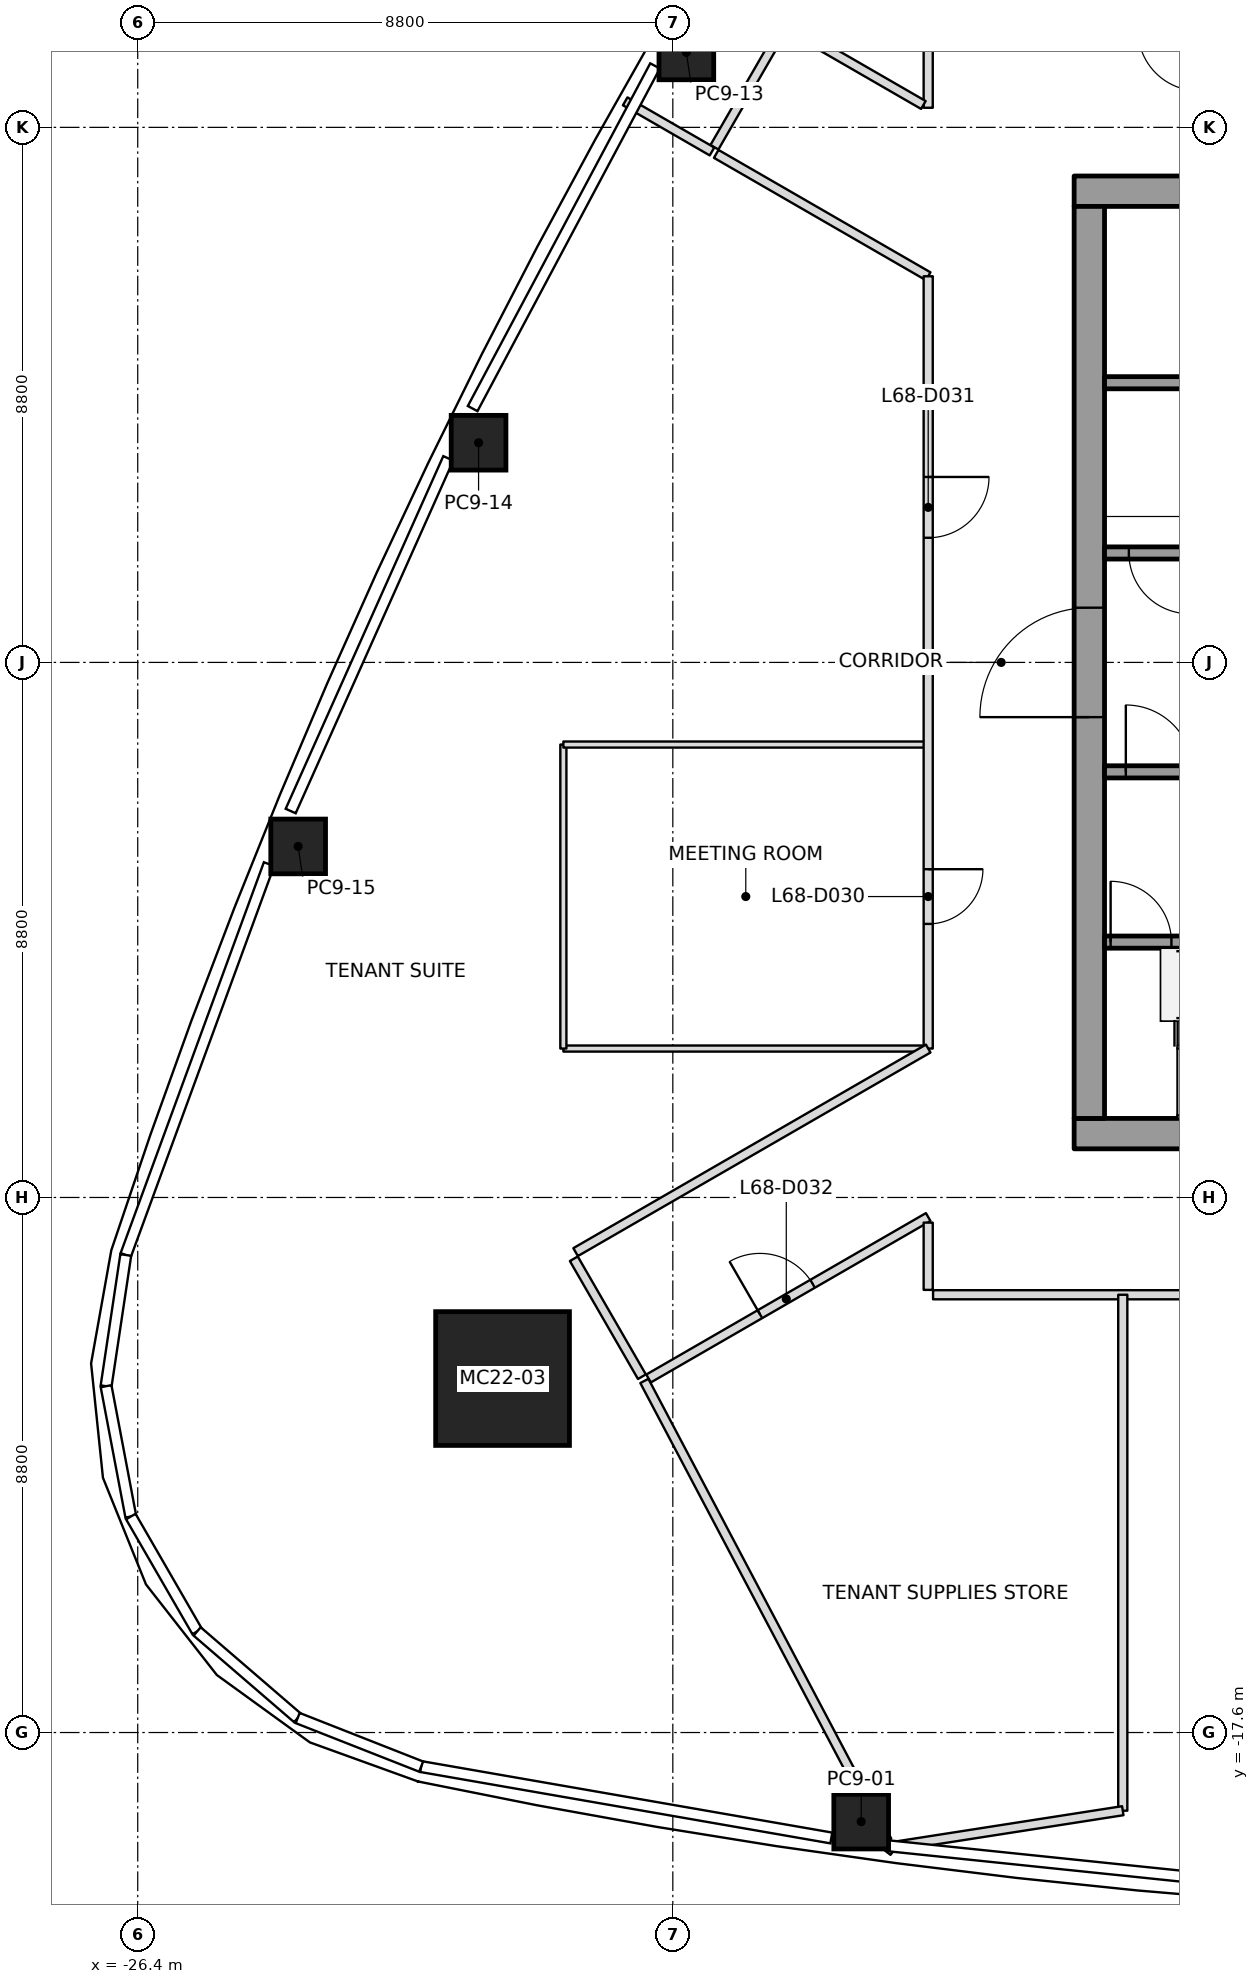
"""IFC4 building model, lengths in metres.
Left out: names, types, materials, properties, quantities, classifications, styles, units other than length and angle.
Written with IfcOpenShell. Run it as: python <this file> out.ifc"""

import sys

from ifc_helpers import new_model, si_unit, direction, frame, frame_2d, origin, origin_2d, place, context, subcontext, project, spatial, rectangle, extrude, element, fill, save


model = new_model("IFC4")
c1 = context("Model", 3, precision=1e-05, world=origin(), true_north=direction((0.0, 1.0)))
c2 = subcontext(c1, "Body", "Model", "MODEL_VIEW")
j1 = project(units=[si_unit("LENGTHUNIT", "METRE"), si_unit("PLANEANGLEUNIT", "RADIAN")], contexts=[c1])
p1 = place(None, origin())
s1 = spatial("IfcSite", under=j1, at=p1, CompositionType="ELEMENT")
p2 = place(p1, origin())
s2 = spatial("IfcBuilding", under=s1, at=p2, CompositionType="ELEMENT")
p3 = place(p2, frame((0.0, 0.0, 299.0)))
s3 = spatial("IfcBuildingStorey", under=s2, at=p3, CompositionType="ELEMENT", Elevation=299.0)
p4 = place(p3, frame((-20.4, -11.778, 0.0), z_axis=(0.027695790401, 0.015983033227, 0.999488612163), x_axis=(0.999616398022, -0.00044283261, -0.027692249912)))
e1 = element("IfcColumn", 1, at=p4, inside=s3, PredefinedType="COLUMN", context=c2, shape_type="SweptSolid", body=[
    extrude(rectangle(XDim=2.2, YDim=2.2, at=origin_2d()), origin(), (0.0, 0.0, 1.0), 4.002),
])
p5 = place(p3, frame((-14.502, -19.065, 0.0), z_axis=(0.017452456582, 0.010373837829, 0.999793876381), x_axis=(-0.99036627662, 0.137561189622, 0.015860556206)))
e2 = element("IfcColumn", 2, at=p5, inside=s3, PredefinedType="COLUMN", context=c2, shape_type="SweptSolid", body=[
    extrude(rectangle(XDim=0.9, YDim=0.9, at=origin_2d()), origin(), (0.0, 0.0, 1.0), 4.001),
])
p6 = place(p3, frame((-17.377, 10.033, 0.0), z_axis=(0.009887049298, -0.00573692984, 0.999934664812), x_axis=(0.499975560967, 0.866039512843, 2.5126546e-05)))
e3 = element("IfcColumn", 3, at=p6, inside=s3, PredefinedType="COLUMN", context=c2, shape_type="SweptSolid", body=[
    extrude(rectangle(XDim=0.9, YDim=0.9, at=origin_2d()), origin(), (0.0, 0.0, 1.0), 4.0),
])
p7 = place(p3, frame((-20.795, 3.613, 0.0), z_axis=(0.014097691364, 0.002013955909, 0.999898594398), x_axis=(0.439136769139, 0.898384596408, -0.008000932944)))
e4 = element("IfcColumn", 4, at=p7, inside=s3, PredefinedType="COLUMN", context=c2, shape_type="SweptSolid", body=[
    extrude(rectangle(XDim=0.9, YDim=0.9, at=origin_2d()), origin(), (0.0, 0.0, 1.0), 4.0),
])
p8 = place(p3, frame((-23.762, -3.027, 0.0), z_axis=(0.017696558482, 0.009885663704, 0.999794531627), x_axis=(0.376217086223, 0.926396492836, -0.015819042166)))
e5 = element("IfcColumn", 5, at=p8, inside=s3, PredefinedType="COLUMN", context=c2, shape_type="SweptSolid", body=[
    extrude(rectangle(XDim=0.9, YDim=0.9, at=origin_2d()), origin(), (0.0, 0.0, 1.0), 4.001),
])
p9 = place(p3, frame((-11.0, -7.75, 0.0), z_axis=(0.0, 0.0, 1.0), x_axis=(1.0, 0.0, 0.0)))
e6 = element("IfcWall", 6, at=p9, inside=s3, PredefinedType="SHEAR", context=c2, shape_type="SweptSolid", body=[
    extrude(rectangle(XDim=22.0, YDim=0.5, at=frame_2d((11.0, 0.0))), origin(), (0.0, 0.0, 1.0), 4.0),
])
p10 = place(p9, frame((10.45, 0.0, 0.0)))
e7 = element("IfcOpeningElement", 7, at=p10, cuts=e6, PredefinedType="OPENING", context=c2, shape_type="SweptSolid", body=[
    extrude(rectangle(XDim=1.1, YDim=2.1, at=frame_2d((0.55, 1.05))), frame((0.0, 0.25, 0.0), z_axis=(0.0, -1.0, 0.0), x_axis=(1.0, 0.0, 0.0)), (0.0, 0.0, 1.0), 0.5),
])
p11 = place(p3, frame((-11.0, 7.75, 0.0), z_axis=(0.0, 0.0, 1.0), x_axis=(1.0, 0.0, 0.0)))
e8 = element("IfcWall", 8, at=p11, inside=s3, PredefinedType="SHEAR", context=c2, shape_type="SweptSolid", body=[
    extrude(rectangle(XDim=22.0, YDim=0.5, at=frame_2d((11.0, 0.0))), origin(), (0.0, 0.0, 1.0), 4.0),
])
p12 = place(p11, frame((10.45, 0.0, 0.0)))
e9 = element("IfcOpeningElement", 9, at=p12, cuts=e8, PredefinedType="OPENING", context=c2, shape_type="SweptSolid", body=[
    extrude(rectangle(XDim=1.1, YDim=2.1, at=frame_2d((0.55, 1.05))), frame((0.0, 0.25, 0.0), z_axis=(0.0, -1.0, 0.0), x_axis=(1.0, 0.0, 0.0)), (0.0, 0.0, 1.0), 0.5),
])
p13 = place(p3, frame((-10.75, -7.5, 0.0), z_axis=(0.0, 0.0, 1.0), x_axis=(0.0, 1.0, 0.0)))
e10 = element("IfcWall", 10, at=p13, inside=s3, PredefinedType="SHEAR", context=c2, shape_type="SweptSolid", body=[
    extrude(rectangle(XDim=15.0, YDim=0.5, at=frame_2d((7.5, 0.0))), origin(), (0.0, 0.0, 1.0), 4.0),
])
p14 = place(p13, frame((6.6, 0.0, 0.0)))
e11 = element("IfcOpeningElement", 11, at=p14, cuts=e10, PredefinedType="OPENING", context=c2, shape_type="SweptSolid", body=[
    extrude(rectangle(XDim=1.8, YDim=2.1, at=frame_2d((0.9, 1.05))), frame((0.0, 0.25, 0.0), z_axis=(0.0, -1.0, 0.0), x_axis=(1.0, 0.0, 0.0)), (0.0, 0.0, 1.0), 0.5),
])
p15 = place(p3, frame((-10.5, -4.6, 0.0), z_axis=(0.0, 0.0, 1.0), x_axis=(1.0, 0.0, 0.0)))
e12 = element("IfcWall", 12, at=p15, inside=s3, PredefinedType="SOLIDWALL", context=c2, shape_type="SweptSolid", body=[
    extrude(rectangle(XDim=1.8, YDim=0.2, at=frame_2d((0.9, 0.0))), origin(), (0.0, 0.0, 1.0), 3.85),
])
p16 = place(p15, frame((0.1, 0.0, 0.0)))
e13 = element("IfcOpeningElement", 13, at=p16, cuts=e12, PredefinedType="OPENING", context=c2, shape_type="SweptSolid", body=[
    extrude(rectangle(XDim=1.0, YDim=2.1, at=frame_2d((0.5, 1.05))), frame((0.0, 0.1, 0.0), z_axis=(0.0, -1.0, 0.0), x_axis=(1.0, 0.0, 0.0)), (0.0, 0.0, 1.0), 0.2),
])
p17 = place(p3, frame((-10.5, -1.8, 0.0), z_axis=(0.0, 0.0, 1.0), x_axis=(1.0, 0.0, 0.0)))
e14 = element("IfcWall", 14, at=p17, inside=s3, PredefinedType="SOLIDWALL", context=c2, shape_type="SweptSolid", body=[
    extrude(rectangle(XDim=1.8, YDim=0.2, at=frame_2d((0.9, 0.0))), origin(), (0.0, 0.0, 1.0), 3.85),
])
p18 = place(p17, frame((0.35, 0.0, 0.0)))
e15 = element("IfcOpeningElement", 15, at=p18, cuts=e14, PredefinedType="OPENING", context=c2, shape_type="SweptSolid", body=[
    extrude(rectangle(XDim=1.1, YDim=2.1, at=frame_2d((0.55, 1.05))), frame((0.0, 0.1, 0.0), z_axis=(0.0, -1.0, 0.0), x_axis=(1.0, 0.0, 0.0)), (0.0, 0.0, 1.0), 0.2),
])
p19 = place(p3, frame((-8.7, 1.8, 0.0), z_axis=(0.0, 0.0, 1.0), x_axis=(-1.0, 0.0, 0.0)))
e16 = element("IfcWall", 16, at=p19, inside=s3, PredefinedType="SOLIDWALL", context=c2, shape_type="SweptSolid", body=[
    extrude(rectangle(XDim=1.8, YDim=0.2, at=frame_2d((0.9, 0.0))), origin(), (0.0, 0.0, 1.0), 3.85),
])
p20 = place(p19, frame((0.4, 0.0, 0.0)))
e17 = element("IfcOpeningElement", 17, at=p20, cuts=e16, PredefinedType="OPENING", context=c2, shape_type="SweptSolid", body=[
    extrude(rectangle(XDim=1.0, YDim=2.1, at=frame_2d((0.5, 1.05))), frame((0.0, 0.1, 0.0), z_axis=(0.0, -1.0, 0.0), x_axis=(1.0, 0.0, 0.0)), (0.0, 0.0, 1.0), 0.2),
])
p21 = place(p3, frame((-8.7, 4.6, 0.0), z_axis=(0.0, 0.0, 1.0), x_axis=(-1.0, 0.0, 0.0)))
e18 = element("IfcWall", 18, at=p21, inside=s3, PredefinedType="SOLIDWALL", context=c2, shape_type="SweptSolid", body=[
    extrude(rectangle(XDim=1.8, YDim=0.2, at=frame_2d((0.9, 0.0))), origin(), (0.0, 0.0, 1.0), 3.85),
])
p22 = place(p3, frame((-16.956, 8.404, 0.0), z_axis=(0.0, 0.0, 1.0), x_axis=(-0.865983361098, 0.500072813, 0.0)))
e19 = element("IfcWall", 19, at=p22, inside=s3, PredefinedType="PARTITIONING", context=c2, shape_type="SweptSolid", body=[
    extrude(rectangle(XDim=1.649, YDim=0.15, at=frame_2d((0.824, 0.0))), origin(), (0.0, 0.0, 1.0), 3.234),
])
p23 = place(p3, frame((-18.068, -11.817, 0.0), z_axis=(0.0, 0.0, 1.0), x_axis=(0.467006069064, -0.88425411023, 0.0)))
e20 = element("IfcWall", 20, at=p23, inside=s3, PredefinedType="PARTITIONING", context=c2, shape_type="SweptSolid", body=[
    extrude(rectangle(XDim=8.552, YDim=0.15, at=frame_2d((4.276, 0.0))), origin(), (0.0, 0.0, 1.0), 3.45),
])
p24 = place(p3, frame((-10.2, -10.4, 0.0), z_axis=(0.0, 0.0, 1.0), x_axis=(0.0, -1.0, 0.0)))
e21 = element("IfcWall", 21, at=p24, inside=s3, PredefinedType="PARTITIONING", context=c2, shape_type="SweptSolid", body=[
    extrude(rectangle(XDim=8.486, YDim=0.15, at=frame_2d((4.243, 0.0))), origin(), (0.0, 0.0, 1.0), 3.45),
])
p25 = place(p3, frame((-10.2, -18.886, 0.0), z_axis=(0.0, 0.0, 1.0), x_axis=(-0.988077086967, -0.15395996301, 0.0)))
e22 = element("IfcWall", 22, at=p25, inside=s3, PredefinedType="PARTITIONING", context=c2, shape_type="SweptSolid", body=[
    extrude(rectangle(XDim=3.769, YDim=0.15, at=frame_2d((1.885, 0.0))), origin(), (0.0, 0.0, 1.0), 3.234),
])
p26 = place(p3, frame((-13.974, -19.552, 0.0), z_axis=(0.0, 0.0, 1.0), x_axis=(-0.791052984113, 0.611747641047, 0.0)))
e23 = element("IfcWall", 23, at=p26, inside=s3, PredefinedType="PARTITIONING", context=c2, shape_type="SweptSolid", body=[
    extrude(rectangle(XDim=0.185, YDim=0.15, at=frame_2d((0.093, 0.0))), origin(), (0.0, 0.0, 1.0), 3.45),
])
p27 = place(p3, frame((-19.228, -9.808, 0.0), z_axis=(0.0, 0.0, 1.0), x_axis=(0.49994888933, -0.866054910533, 0.0)))
e24 = element("IfcWall", 24, at=p27, inside=s3, PredefinedType="PARTITIONING", context=c2, shape_type="SweptSolid", body=[
    extrude(rectangle(XDim=2.24, YDim=0.15, at=frame_2d((1.12, 0.0))), origin(), (0.0, 0.0, 1.0), 3.233),
])
p28 = place(p3, frame((-16.886, 8.364, 0.0), z_axis=(0.0, 0.0, 1.0), x_axis=(0.866040157966, -0.499974444137, 0.0)))
e25 = element("IfcWall", 25, at=p28, inside=s3, PredefinedType="PARTITIONING", context=c2, shape_type="SweptSolid", body=[
    extrude(rectangle(XDim=4.026, YDim=0.15, at=frame_2d((2.013, 0.0))), origin(), (0.0, 0.0, 1.0), 3.45),
])
p29 = place(p3, frame((-13.4, 6.351, 0.0), z_axis=(0.0, 0.0, 1.0), x_axis=(0.0, -1.0, 0.0)))
e26 = element("IfcWall", 26, at=p29, inside=s3, PredefinedType="PARTITIONING", context=c2, shape_type="SweptSolid", body=[
    extrude(rectangle(XDim=12.702, YDim=0.15, at=frame_2d((6.351, 0.0))), origin(), (0.0, 0.0, 1.0), 3.317),
])
p30 = place(p29, frame((9.752, 0.0, 0.0)))
e27 = element("IfcOpeningElement", 27, at=p30, cuts=e26, PredefinedType="OPENING", context=c2, shape_type="SweptSolid", body=[
    extrude(rectangle(XDim=0.9, YDim=2.1, at=frame_2d((0.45, 1.05))), frame((0.0, 0.075, 0.0), z_axis=(0.0, -1.0, 0.0), x_axis=(1.0, 0.0, 0.0)), (0.0, 0.0, 1.0), 0.15),
])
p31 = place(p29, frame((3.301, 0.0, 0.0)))
e28 = element("IfcOpeningElement", 28, at=p31, cuts=e26, PredefinedType="OPENING", context=c2, shape_type="SweptSolid", body=[
    extrude(rectangle(XDim=1.0, YDim=2.1, at=frame_2d((0.5, 1.05))), frame((0.0, 0.075, 0.0), z_axis=(0.0, -1.0, 0.0), x_axis=(1.0, 0.0, 0.0)), (0.0, 0.0, 1.0), 0.15),
])
p32 = place(p3, frame((-13.4, -6.351, 0.0), z_axis=(0.0, 0.0, 1.0), x_axis=(-0.866028933908, -0.499993885596, 0.0)))
e29 = element("IfcWall", 29, at=p32, inside=s3, PredefinedType="PARTITIONING", context=c2, shape_type="SweptSolid", body=[
    extrude(rectangle(XDim=6.696, YDim=0.15, at=frame_2d((3.348, 0.0))), origin(), (0.0, 0.0, 1.0), 3.247),
])
p33 = place(p3, frame((-17.999, -11.777, 0.0), z_axis=(0.0, 0.0, 1.0), x_axis=(0.866036293601, 0.499981137809, 0.0)))
e30 = element("IfcWall", 30, at=p33, inside=s3, PredefinedType="PARTITIONING", context=c2, shape_type="SweptSolid", body=[
    extrude(rectangle(XDim=5.31, YDim=0.15, at=frame_2d((2.655, 0.0))), origin(), (0.0, 0.0, 1.0), 3.233),
])
p34 = place(p33, frame((2.115, 0.0, 0.0)))
e31 = element("IfcOpeningElement", 31, at=p34, cuts=e30, PredefinedType="OPENING", context=c2, shape_type="SweptSolid", body=[
    extrude(rectangle(XDim=1.0, YDim=2.1, at=frame_2d((0.5, 1.05))), frame((0.0, 0.075, 0.0), z_axis=(0.0, -1.0, 0.0), x_axis=(1.0, 0.0, 0.0)), (0.0, 0.0, 1.0), 0.15),
])
p35 = place(p3, frame((-13.4, -9.214, 0.0), z_axis=(0.0, 0.0, 1.0), x_axis=(0.0, -1.0, 0.0)))
e32 = element("IfcWall", 32, at=p35, inside=s3, PredefinedType="PARTITIONING", context=c2, shape_type="SweptSolid", body=[
    extrude(rectangle(XDim=1.106, YDim=0.15, at=frame_2d((0.553, 0.0))), origin(), (0.0, 0.0, 1.0), 3.233),
])
p36 = place(p3, frame((-15.795, 10.413, 0.0), z_axis=(0.0, 0.0, 1.0), x_axis=(-0.500030632641, -0.866007717299, 0.0)))
e33 = element("IfcWall", 33, at=p36, inside=s3, PredefinedType="PARTITIONING", context=c2, shape_type="SweptSolid", body=[
    extrude(rectangle(XDim=2.24, YDim=0.15, at=frame_2d((1.12, 0.0))), origin(), (0.0, 0.0, 1.0), 3.45),
])
p37 = place(p3, frame((-13.4, 10.32, 0.0), z_axis=(0.0, 0.0, 1.0), x_axis=(0.0, -1.0, 0.0)))
e34 = element("IfcWall", 34, at=p37, inside=s3, PredefinedType="PARTITIONING", context=c2, shape_type="SweptSolid", body=[
    extrude(rectangle(XDim=1.198, YDim=0.15, at=frame_2d((0.599, 0.0))), origin(), (0.0, 0.0, 1.0), 3.45),
])
p38 = place(p3, frame((-13.479, 9.168, 0.0), z_axis=(0.0, 0.0, 1.0), x_axis=(-0.866051946521, 0.499954023813, 0.0)))
e35 = element("IfcWall", 35, at=p38, inside=s3, PredefinedType="PARTITIONING", context=c2, shape_type="SweptSolid", body=[
    extrude(rectangle(XDim=2.464, YDim=0.15, at=frame_2d((1.232, 0.0))), origin(), (0.0, 0.0, 1.0), 3.45),
])
p39 = place(p3, frame((-13.32, -10.4, 0.0), z_axis=(0.0, 0.0, 1.0), x_axis=(1.0, 0.0, 0.0)))
e36 = element("IfcWall", 36, at=p39, inside=s3, PredefinedType="PARTITIONING", context=c2, shape_type="SweptSolid", body=[
    extrude(rectangle(XDim=12.12, YDim=0.15, at=frame_2d((6.06, 0.0))), origin(), (0.0, 0.0, 1.0), 3.393),
])
p40 = place(p39, frame((7.12, 0.0, 0.0)))
e37 = element("IfcOpeningElement", 37, at=p40, cuts=e36, PredefinedType="OPENING", context=c2, shape_type="SweptSolid", body=[
    extrude(rectangle(XDim=1.0, YDim=2.1, at=frame_2d((0.5, 1.05))), frame((0.0, 0.075, 0.0), z_axis=(0.0, -1.0, 0.0), x_axis=(1.0, 0.0, 0.0)), (0.0, 0.0, 1.0), 0.15),
])
p41 = place(p3, frame((-13.46, -6.351, 0.0), z_axis=(0.0, 0.0, 1.0), x_axis=(-1.0, 0.0, 0.0)))
e38 = element("IfcWall", 38, at=p41, inside=s3, PredefinedType="PARTITIONING", context=c2, shape_type="SweptSolid", body=[
    extrude(rectangle(XDim=5.94, YDim=0.1, at=frame_2d((2.97, 0.0))), origin(), (0.0, 0.0, 1.0), 3.247),
])
p42 = place(p3, frame((-19.4, -6.351, 0.0), z_axis=(0.0, 0.0, 1.0), x_axis=(0.0, 1.0, 0.0)))
e39 = element("IfcWall", 39, at=p42, inside=s3, PredefinedType="PARTITIONING", context=c2, shape_type="SweptSolid", body=[
    extrude(rectangle(XDim=5.0, YDim=0.1, at=frame_2d((2.5, 0.0))), origin(), (0.0, 0.0, 1.0), 3.247),
])
p43 = place(p3, frame((-19.4, -1.351, 0.0), z_axis=(0.0, 0.0, 1.0), x_axis=(1.0, 0.0, 0.0)))
e40 = element("IfcWall", 40, at=p43, inside=s3, PredefinedType="PARTITIONING", context=c2, shape_type="SweptSolid", body=[
    extrude(rectangle(XDim=5.97, YDim=0.1, at=frame_2d((2.985, 0.0))), origin(), (0.0, 0.0, 1.0), 3.317),
])
p44 = place(p30, origin())
e41 = element("IfcDoor", 41, at=p44, inside=s3, OperationType="SINGLE_SWING_LEFT", PredefinedType="DOOR", context=c2, shape_type="SweptSolid", body=[
    extrude(rectangle(XDim=0.9, YDim=2.1, at=frame_2d((0.45, 1.05))), frame((0.0, 0.025, 0.0), z_axis=(0.0, -1.0, 0.0), x_axis=(1.0, 0.0, 0.0)), (0.0, 0.0, 1.0), 0.05),
])
fill(e27, e41)
p45 = place(p31, origin())
e42 = element("IfcDoor", 42, at=p45, inside=s3, OperationType="SINGLE_SWING_LEFT", PredefinedType="DOOR", context=c2, shape_type="SweptSolid", body=[
    extrude(rectangle(XDim=1.0, YDim=2.1, at=frame_2d((0.5, 1.05))), frame((0.0, 0.025, 0.0), z_axis=(0.0, -1.0, 0.0), x_axis=(1.0, 0.0, 0.0)), (0.0, 0.0, 1.0), 0.05),
])
fill(e28, e42)
p46 = place(p34, origin())
e43 = element("IfcDoor", 43, at=p46, inside=s3, OperationType="SINGLE_SWING_RIGHT", PredefinedType="DOOR", context=c2, shape_type="SweptSolid", body=[
    extrude(rectangle(XDim=1.0, YDim=2.1, at=frame_2d((0.5, 1.05))), frame((0.0, 0.025, 0.0), z_axis=(0.0, -1.0, 0.0), x_axis=(1.0, 0.0, 0.0)), (0.0, 0.0, 1.0), 0.05),
])
fill(e31, e43)
p47 = place(p18, origin())
e44 = element("IfcDoor", 44, at=p47, inside=s3, OperationType="SINGLE_SWING_RIGHT", PredefinedType="DOOR", context=c2, shape_type="SweptSolid", body=[
    extrude(rectangle(XDim=1.1, YDim=2.1, at=frame_2d((0.55, 1.05))), frame((0.0, 0.025, 0.0), z_axis=(0.0, -1.0, 0.0), x_axis=(1.0, 0.0, 0.0)), (0.0, 0.0, 1.0), 0.05),
])
fill(e15, e44)
p48 = place(p20, origin())
e45 = element("IfcDoor", 45, at=p48, inside=s3, OperationType="SINGLE_SWING_LEFT", PredefinedType="DOOR", context=c2, shape_type="SweptSolid", body=[
    extrude(rectangle(XDim=1.0, YDim=2.1, at=frame_2d((0.5, 1.05))), frame((0.0, 0.025, 0.0), z_axis=(0.0, -1.0, 0.0), x_axis=(1.0, 0.0, 0.0)), (0.0, 0.0, 1.0), 0.05),
])
fill(e17, e45)
p49 = place(p16, origin())
e46 = element("IfcDoor", 46, at=p49, inside=s3, OperationType="SINGLE_SWING_LEFT", PredefinedType="DOOR", context=c2, shape_type="SweptSolid", body=[
    extrude(rectangle(XDim=1.0, YDim=2.1, at=frame_2d((0.5, 1.05))), frame((0.0, 0.025, 0.0), z_axis=(0.0, -1.0, 0.0), x_axis=(1.0, 0.0, 0.0)), (0.0, 0.0, 1.0), 0.05),
])
fill(e13, e46)
p50 = place(p14, origin())
e47 = element("IfcDoor", 47, at=p50, inside=s3, OperationType="DOUBLE_DOOR_SINGLE_SWING", PredefinedType="DOOR", context=c2, shape_type="SweptSolid", body=[
    extrude(rectangle(XDim=1.8, YDim=2.1, at=frame_2d((0.9, 1.05))), frame((0.0, 0.025, 0.0), z_axis=(0.0, -1.0, 0.0), x_axis=(1.0, 0.0, 0.0)), (0.0, 0.0, 1.0), 0.05),
])
fill(e11, e47)
save(model, sys.argv[1])
